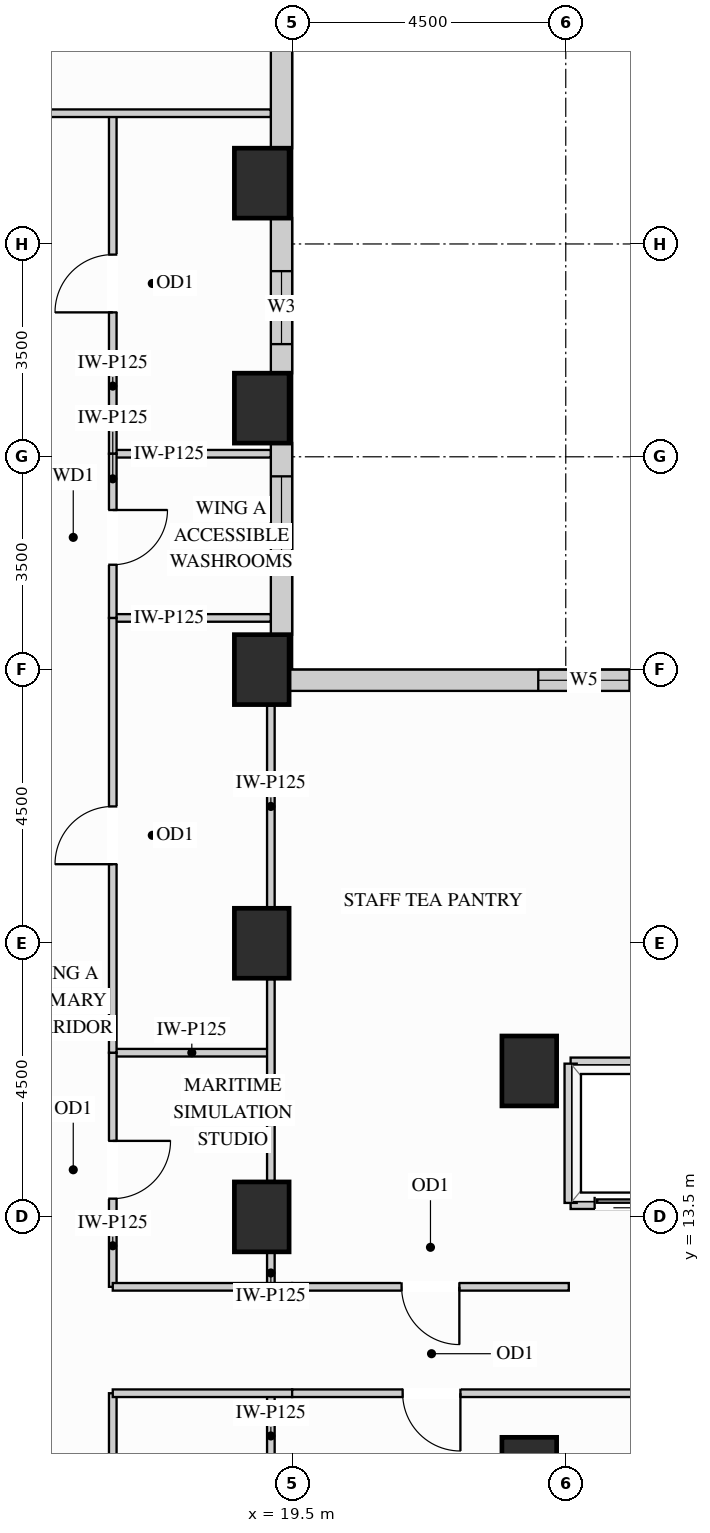
"""IFC4 building model, lengths in metres.
Left out: names, types, materials, properties, quantities, classifications, styles, units other than length and angle.
Written with IfcOpenShell. Run it as: python <this file> out.ifc"""

import sys

from ifc_helpers import new_model, si_unit, direction, frame, frame_2d, origin, origin_2d, place, context, subcontext, project, spatial, rectangle, extrude, source, transform, mapped, element, fill, save


model = new_model("IFC4")
c1 = context("Model", 3, precision=1e-05, world=origin(), true_north=direction((0.0, 1.0)))
c2 = subcontext(c1, "Body", "Model", "MODEL_VIEW")
j1 = project(units=[si_unit("LENGTHUNIT", "METRE"), si_unit("PLANEANGLEUNIT", "RADIAN")], contexts=[c1])
p1 = place(None, origin())
s1 = spatial("IfcSite", under=j1, at=p1, CompositionType="ELEMENT")
p2 = place(p1, origin())
s2 = spatial("IfcBuilding", under=s1, at=p2, CompositionType="ELEMENT")
p3 = place(p2, frame((0.0, 0.0, 77.4)))
s3 = spatial("IfcBuildingStorey", under=s2, at=p3, CompositionType="ELEMENT", Elevation=77.4)
m1 = source(origin(), c2, "Body", "SweptSolid", [
    extrude(rectangle(XDim=0.9, YDim=1.15, at=origin_2d()), origin(), (0.0, 0.0, 1.0), 3.38),
])
for number, where, z_axis, x_axis in (
    (1, (19.0, 13.5, 0.0), (0.0, 0.0, 1.0), (1.0, 0.0, 0.0)),
    (2, (19.0, 18.0, 0.0), (0.0, 0.0, 1.0), (1.0, 0.0, 0.0)),
    (3, (19.0, 22.5, 0.0), (0.0, 0.0, 1.0), (1.0, 0.0, 0.0)),
    (4, (19.0, 26.8, 0.0), (0.0, 0.0, 1.0), (1.0, 0.0, 0.0)),
    (5, (19.0, 30.5, 0.0), (0.0, 0.0, 1.0), (1.0, 0.0, 0.0)),
    (6, (23.4, 15.9, 0.0), (0.0, 0.0, 1.0), (1.0, 0.0, 0.0)),
    (7, (23.4, 9.3, 0.0), (0.0, 0.0, 1.0), (1.0, 0.0, 0.0)),
):
    element("IfcColumn", number, at=place(p3, frame(where, z_axis=z_axis, x_axis=x_axis)), inside=s3, PredefinedType="COLUMN", context=c2, shape_type="MappedRepresentation", body=[
        mapped(m1, transform((0.0, 0.0, 0.0), x_axis=(1.0, 0.0, 0.0), y_axis=(0.0, 1.0, 0.0), z_axis=(0.0, 0.0, 1.0))),
    ])
p4 = place(p3, frame((34.427, 22.325, 0.0), z_axis=(0.0, 0.0, 1.0), x_axis=(-1.0, 0.0, 0.0)))
e8 = element("IfcWall", 8, at=p4, inside=s3, PredefinedType="SOLIDWALL", context=c2, shape_type="SweptSolid", body=[
    extrude(rectangle(XDim=14.979, YDim=0.35, at=frame_2d((7.49, 0.0))), origin(), (0.0, 0.0, 1.0), 3.365),
])
p5 = place(p4, frame((4.1, 0.0, 0.78)))
e9 = element("IfcOpeningElement", 9, at=p5, cuts=e8, PredefinedType="OPENING", context=c2, shape_type="SweptSolid", body=[
    extrude(rectangle(XDim=1.5, YDim=2.0, at=frame_2d((0.75, 1.0))), frame((0.0, 0.185, 0.0), z_axis=(0.0, -1.0, 0.0), x_axis=(1.0, 0.0, 0.0)), (0.0, 0.0, 1.0), 0.37),
])
p6 = place(p4, frame((9.379, 0.0, 0.78)))
e10 = element("IfcOpeningElement", 10, at=p6, cuts=e8, PredefinedType="OPENING", context=c2, shape_type="SweptSolid", body=[
    extrude(rectangle(XDim=1.5, YDim=2.0, at=frame_2d((0.75, 1.0))), frame((0.0, 0.185, 0.0), z_axis=(0.0, -1.0, 0.0), x_axis=(1.0, 0.0, 0.0)), (0.0, 0.0, 1.0), 0.37),
])
p7 = place(p3, frame((19.325, 23.073, 0.0), z_axis=(0.0, 0.0, 1.0), x_axis=(0.0, 1.0, 0.0)))
e11 = element("IfcWall", 11, at=p7, inside=s3, PredefinedType="SOLIDWALL", context=c2, shape_type="SweptSolid", body=[
    extrude(rectangle(XDim=3.154, YDim=0.35, at=frame_2d((1.577, 0.0))), origin(), (0.0, 0.0, 1.0), 2.519),
])
p8 = place(p7, frame((1.105, 0.0, 0.78)))
e12 = element("IfcOpeningElement", 12, at=p8, cuts=e11, PredefinedType="OPENING", context=c2, shape_type="SweptSolid", body=[
    extrude(rectangle(XDim=1.5, YDim=1.559, at=frame_2d((0.75, 0.78))), frame((0.0, 0.185, 0.0), z_axis=(0.0, -1.0, 0.0), x_axis=(1.0, 0.0, 0.0)), (0.0, 0.0, 1.0), 0.37),
])
p9 = place(p3, frame((19.325, 27.373, 0.0), z_axis=(0.0, 0.0, 1.0), x_axis=(0.0, 1.0, 0.0)))
e13 = element("IfcWall", 13, at=p9, inside=s3, PredefinedType="SOLIDWALL", context=c2, shape_type="SweptSolid", body=[
    extrude(rectangle(XDim=2.554, YDim=0.35, at=frame_2d((1.277, 0.0))), origin(), (0.0, 0.0, 1.0), 2.519),
])
p10 = place(p9, frame((0.48, 0.0, 0.78)))
e14 = element("IfcOpeningElement", 14, at=p10, cuts=e13, PredefinedType="OPENING", context=c2, shape_type="SweptSolid", body=[
    extrude(rectangle(XDim=1.2, YDim=1.559, at=frame_2d((0.6, 0.78))), frame((0.0, 0.185, 0.0), z_axis=(0.0, -1.0, 0.0), x_axis=(1.0, 0.0, 0.0)), (0.0, 0.0, 1.0), 0.37),
])
m2 = source(origin(), c2, "Body", "SweptSolid", [
    extrude(rectangle(XDim=3.354, YDim=0.35, at=frame_2d((1.677, 0.0))), origin(), (0.0, 0.0, 1.0), 2.519),
])
p11 = place(p3, frame((19.325, 31.073, 0.0), z_axis=(0.0, 0.0, 1.0), x_axis=(0.0, 1.0, 0.0)))
e15 = element("IfcWall", 15, at=p11, inside=s3, PredefinedType="SOLIDWALL", context=c2, shape_type="MappedRepresentation", body=[
    mapped(m2, transform((0.0, 0.0, 0.0), x_axis=(1.0, 0.0, 0.0), y_axis=(0.0, 1.0, 0.0), z_axis=(0.0, 0.0, 1.0))),
])
m3 = source(origin(), c2, "Body", "SweptSolid", [
    extrude(rectangle(XDim=2.6, YDim=0.125, at=frame_2d((1.3, 0.0))), origin(), (0.0, 0.0, 1.0), 3.365),
])
p12 = place(p3, frame((16.55, 16.2, 0.0), z_axis=(0.0, 0.0, 1.0), x_axis=(1.0, 0.0, 0.0)))
e16 = element("IfcWall", 16, at=p12, inside=s3, PredefinedType="PARTITIONING", context=c2, shape_type="MappedRepresentation", body=[
    mapped(m3, transform((0.0, 0.0, 0.0), x_axis=(1.0, 0.0, 0.0), y_axis=(0.0, 1.0, 0.0), z_axis=(0.0, 0.0, 1.0))),
])
m4 = source(origin(), c2, "Body", "SweptSolid", [
    extrude(rectangle(XDim=2.598, YDim=0.125, at=frame_2d((1.299, 0.0))), origin(), (0.0, 0.0, 1.0), 3.365),
])
for number, where, z_axis, x_axis in (
    (17, (16.55, 23.35, 0.0), (0.0, 0.0, 1.0), (1.0, 0.0, 0.0)),
    (18, (16.55, 26.05, 0.0), (0.0, 0.0, 1.0), (1.0, 0.0, 0.0)),
):
    element("IfcWall", number, at=place(p3, frame(where, z_axis=z_axis, x_axis=x_axis)), inside=s3, PredefinedType="PARTITIONING", context=c2, shape_type="MappedRepresentation", body=[
        mapped(m4, transform((0.0, 0.0, 0.0), x_axis=(1.0, 0.0, 0.0), y_axis=(0.0, 1.0, 0.0), z_axis=(0.0, 0.0, 1.0))),
    ])
m5 = source(origin(), c2, "Body", "SweptSolid", [
    extrude(rectangle(XDim=0.56, YDim=0.125, at=frame_2d((0.28, 0.0))), origin(), (0.0, 0.0, 1.0), 2.677),
])
p13 = place(p3, frame((19.15, 12.35, 0.0), z_axis=(0.0, 0.0, 1.0), x_axis=(0.0, 1.0, 0.0)))
e19 = element("IfcWall", 19, at=p13, inside=s3, PredefinedType="PARTITIONING", context=c2, shape_type="MappedRepresentation", body=[
    mapped(m5, transform((0.0, 0.0, 0.0), x_axis=(1.0, 0.0, 0.0), y_axis=(0.0, 1.0, 0.0), z_axis=(0.0, 0.0, 1.0))),
])
m6 = source(origin(), c2, "Body", "SweptSolid", [
    extrude(rectangle(XDim=3.32, YDim=0.125, at=frame_2d((1.66, 0.0))), origin(), (0.0, 0.0, 1.0), 2.677),
])
for number, where, z_axis, x_axis in (
    (20, (19.15, 14.09, 0.0), (0.0, 0.0, 1.0), (0.0, 1.0, 0.0)),
    (21, (19.15, 18.59, 0.0), (0.0, 0.0, 1.0), (0.0, 1.0, 0.0)),
):
    element("IfcWall", number, at=place(p3, frame(where, z_axis=z_axis, x_axis=x_axis)), inside=s3, PredefinedType="PARTITIONING", context=c2, shape_type="MappedRepresentation", body=[
        mapped(m6, transform((0.0, 0.0, 0.0), x_axis=(1.0, 0.0, 0.0), y_axis=(0.0, 1.0, 0.0), z_axis=(0.0, 0.0, 1.0))),
    ])
m7 = source(origin(), c2, "Body", "SweptSolid", [
    extrude(rectangle(XDim=1.51, YDim=0.125, at=frame_2d((0.755, 0.0))), origin(), (0.0, 0.0, 1.0), 2.677),
])
p14 = place(p3, frame((19.15, 9.09, 0.0), z_axis=(0.0, 0.0, 1.0), x_axis=(0.0, 1.0, 0.0)))
e22 = element("IfcWall", 22, at=p14, inside=s3, PredefinedType="PARTITIONING", context=c2, shape_type="MappedRepresentation", body=[
    mapped(m7, transform((0.0, 0.0, 0.0), x_axis=(1.0, 0.0, 0.0), y_axis=(0.0, 1.0, 0.0), z_axis=(0.0, 0.0, 1.0))),
])
p15 = place(p3, frame((16.55, 12.35, 0.0), z_axis=(0.0, 0.0, 1.0), x_axis=(0.0, 1.0, 0.0)))
e23 = element("IfcWall", 23, at=p15, inside=s3, PredefinedType="PARTITIONING", context=c2, shape_type="SweptSolid", body=[
    extrude(rectangle(XDim=3.85, YDim=0.125, at=frame_2d((1.925, 0.0))), origin(), (0.0, 0.0, 1.0), 3.365),
])
p16 = place(p15, frame((1.45, 0.0, 0.0)))
e24 = element("IfcOpeningElement", 24, at=p16, cuts=e23, PredefinedType="OPENING", context=c2, shape_type="SweptSolid", body=[
    extrude(rectangle(XDim=0.95, YDim=2.15, at=frame_2d((0.475, 1.075))), frame((0.0, 0.073, 0.0), z_axis=(0.0, -1.0, 0.0), x_axis=(1.0, 0.0, 0.0)), (0.0, 0.0, 1.0), 0.145),
])
p17 = place(p3, frame((16.55, 16.2, 0.0), z_axis=(0.0, 0.0, 1.0), x_axis=(0.0, 1.0, 0.0)))
e25 = element("IfcWall", 25, at=p17, inside=s3, PredefinedType="PARTITIONING", context=c2, shape_type="SweptSolid", body=[
    extrude(rectangle(XDim=7.15, YDim=0.125, at=frame_2d((3.575, 0.0))), origin(), (0.0, 0.0, 1.0), 3.365),
])
p18 = place(p17, frame((3.1, 0.0, 0.0)))
e26 = element("IfcOpeningElement", 26, at=p18, cuts=e25, PredefinedType="OPENING", context=c2, shape_type="SweptSolid", body=[
    extrude(rectangle(XDim=0.95, YDim=2.15, at=frame_2d((0.475, 1.075))), frame((0.0, 0.073, 0.0), z_axis=(0.0, -1.0, 0.0), x_axis=(1.0, 0.0, 0.0)), (0.0, 0.0, 1.0), 0.145),
])
p19 = place(p3, frame((16.55, 26.05, 0.0), z_axis=(0.0, 0.0, 1.0), x_axis=(0.0, 1.0, 0.0)))
e27 = element("IfcWall", 27, at=p19, inside=s3, PredefinedType="PARTITIONING", context=c2, shape_type="SweptSolid", body=[
    extrude(rectangle(XDim=5.6, YDim=0.125, at=frame_2d((2.8, 0.0))), origin(), (0.0, 0.0, 1.0), 3.365),
])
p20 = place(p19, frame((2.325, 0.0, 0.0)))
e28 = element("IfcOpeningElement", 28, at=p20, cuts=e27, PredefinedType="OPENING", context=c2, shape_type="SweptSolid", body=[
    extrude(rectangle(XDim=0.95, YDim=2.15, at=frame_2d((0.475, 1.075))), frame((0.0, 0.073, 0.0), z_axis=(0.0, -1.0, 0.0), x_axis=(1.0, 0.0, 0.0)), (0.0, 0.0, 1.0), 0.145),
])
p21 = place(p3, frame((16.55, 4.65, 0.0), z_axis=(0.0, 0.0, 1.0), x_axis=(0.0, 1.0, 0.0)))
e29 = element("IfcWall", 29, at=p21, inside=s3, PredefinedType="PARTITIONING", context=c2, shape_type="SweptSolid", body=[
    extrude(rectangle(XDim=5.95, YDim=0.125, at=frame_2d((2.975, 0.0))), origin(), (0.0, 0.0, 1.0), 3.365),
])
p22 = place(p21, frame((2.5, 0.0, 0.0)))
e30 = element("IfcOpeningElement", 30, at=p22, cuts=e29, PredefinedType="OPENING", context=c2, shape_type="SweptSolid", body=[
    extrude(rectangle(XDim=0.95, YDim=2.15, at=frame_2d((0.475, 1.075))), frame((0.0, 0.073, 0.0), z_axis=(0.0, -1.0, 0.0), x_axis=(1.0, 0.0, 0.0)), (0.0, 0.0, 1.0), 0.145),
])
p23 = place(p3, frame((16.55, 23.35, 0.0), z_axis=(0.0, 0.0, 1.0), x_axis=(0.0, 1.0, 0.0)))
e31 = element("IfcWall", 31, at=p23, inside=s3, PredefinedType="PARTITIONING", context=c2, shape_type="SweptSolid", body=[
    extrude(rectangle(XDim=2.7, YDim=0.125, at=frame_2d((1.35, 0.0))), origin(), (0.0, 0.0, 1.0), 3.365),
])
p24 = place(p23, frame((0.875, 0.0, 0.0)))
e32 = element("IfcOpeningElement", 32, at=p24, cuts=e31, PredefinedType="OPENING", context=c2, shape_type="SweptSolid", body=[
    extrude(rectangle(XDim=0.9, YDim=2.15, at=frame_2d((0.45, 1.075))), frame((0.0, 0.073, 0.0), z_axis=(0.0, -1.0, 0.0), x_axis=(1.0, 0.0, 0.0)), (0.0, 0.0, 1.0), 0.145),
])
m8 = source(origin(), c2, "Body", "SweptSolid", [
    extrude(rectangle(XDim=7.498, YDim=0.125, at=frame_2d((3.749, 0.0))), origin(), (0.0, 0.0, 1.0), 2.828),
])
p25 = place(p3, frame((11.65, 31.65, 0.0), z_axis=(0.0, 0.0, 1.0), x_axis=(1.0, 0.0, 0.0)))
e33 = element("IfcWall", 33, at=p25, inside=s3, PredefinedType="PARTITIONING", context=c2, shape_type="MappedRepresentation", body=[
    mapped(m8, transform((0.0, 0.0, 0.0), x_axis=(1.0, 0.0, 0.0), y_axis=(0.0, 1.0, 0.0), z_axis=(0.0, 0.0, 1.0))),
])
m9 = source(origin(), c2, "Body", "SweptSolid", [
    extrude(rectangle(XDim=2.95, YDim=0.125, at=frame_2d((1.475, 0.0))), origin(), (0.0, 0.0, 1.0), 3.365),
])
p26 = place(p3, frame((16.55, 12.35, 0.0), z_axis=(0.0, 0.0, 1.0), x_axis=(1.0, 0.0, 0.0)))
e34 = element("IfcWall", 34, at=p26, inside=s3, PredefinedType="PARTITIONING", context=c2, shape_type="MappedRepresentation", body=[
    mapped(m9, transform((0.0, 0.0, 0.0), x_axis=(1.0, 0.0, 0.0), y_axis=(0.0, 1.0, 0.0), z_axis=(0.0, 0.0, 1.0))),
])
p27 = place(p3, frame((19.5, 12.35, 0.0), z_axis=(0.0, 0.0, 1.0), x_axis=(1.0, 0.0, 0.0)))
e35 = element("IfcWall", 35, at=p27, inside=s3, PredefinedType="PARTITIONING", context=c2, shape_type="SweptSolid", body=[
    extrude(rectangle(XDim=4.55, YDim=0.125, at=frame_2d((2.275, 0.0))), origin(), (0.0, 0.0, 1.0), 3.365),
])
p28 = place(p27, frame((1.8, 0.0, 0.0)))
e36 = element("IfcOpeningElement", 36, at=p28, cuts=e35, PredefinedType="OPENING", context=c2, shape_type="SweptSolid", body=[
    extrude(rectangle(XDim=0.95, YDim=2.15, at=frame_2d((0.475, 1.075))), frame((0.0, 0.073, 0.0), z_axis=(0.0, -1.0, 0.0), x_axis=(1.0, 0.0, 0.0)), (0.0, 0.0, 1.0), 0.145),
])
p29 = place(p3, frame((16.55, 10.6, 0.0), z_axis=(0.0, 0.0, 1.0), x_axis=(1.0, 0.0, 0.0)))
e37 = element("IfcWall", 37, at=p29, inside=s3, PredefinedType="PARTITIONING", context=c2, shape_type="MappedRepresentation", body=[
    mapped(m9, transform((0.0, 0.0, 0.0), x_axis=(1.0, 0.0, 0.0), y_axis=(0.0, 1.0, 0.0), z_axis=(0.0, 0.0, 1.0))),
])
p30 = place(p3, frame((19.5, 10.6, 0.0), z_axis=(0.0, 0.0, 1.0), x_axis=(1.0, 0.0, 0.0)))
e38 = element("IfcWall", 38, at=p30, inside=s3, PredefinedType="PARTITIONING", context=c2, shape_type="SweptSolid", body=[
    extrude(rectangle(XDim=7.45, YDim=0.125, at=frame_2d((3.725, 0.0))), origin(), (0.0, 0.0, 1.0), 3.365),
])
p31 = place(p30, frame((1.817, 0.0, 0.0)))
e39 = element("IfcOpeningElement", 39, at=p31, cuts=e38, PredefinedType="OPENING", context=c2, shape_type="SweptSolid", body=[
    extrude(rectangle(XDim=0.95, YDim=2.15, at=frame_2d((0.475, 1.075))), frame((0.0, 0.073, 0.0), z_axis=(0.0, -1.0, 0.0), x_axis=(1.0, 0.0, 0.0)), (0.0, 0.0, 1.0), 0.145),
])
m10 = source(origin(), c2, "Body", "SweptSolid", [
    extrude(rectangle(XDim=1.89, YDim=0.2, at=frame_2d((0.945, 0.0))), origin(), (0.0, 0.0, 1.0), 2.677),
])
p32 = place(p3, frame((24.08, 16.02, 0.0), z_axis=(0.0, 0.0, 1.0), x_axis=(1.0, 0.0, 0.0)))
e40 = element("IfcWall", 40, at=p32, inside=s3, PredefinedType="PARTITIONING", context=c2, shape_type="MappedRepresentation", body=[
    mapped(m10, transform((0.0, 0.0, 0.0), x_axis=(1.0, 0.0, 0.0), y_axis=(0.0, 1.0, 0.0), z_axis=(0.0, 0.0, 1.0))),
])
p33 = place(p3, frame((24.08, 13.73, 0.0), z_axis=(0.0, 0.0, 1.0), x_axis=(1.0, 0.0, 0.0)))
e41 = element("IfcWall", 41, at=p33, inside=s3, PredefinedType="PARTITIONING", context=c2, shape_type="SweptSolid", body=[
    extrude(rectangle(XDim=1.89, YDim=0.2, at=frame_2d((0.945, 0.0))), origin(), (0.0, 0.0, 1.0), 2.446),
])
p34 = place(p33, frame((0.395, 0.0, 0.0)))
e42 = element("IfcOpeningElement", 42, at=p34, cuts=e41, PredefinedType="OPENING", context=c2, shape_type="SweptSolid", body=[
    extrude(rectangle(XDim=1.1, YDim=2.2, at=frame_2d((0.55, 1.1))), frame((0.0, 0.11, 0.0), z_axis=(0.0, -1.0, 0.0), x_axis=(1.0, 0.0, 0.0)), (0.0, 0.0, 1.0), 0.22),
])
m11 = source(origin(), c2, "Body", "SweptSolid", [
    extrude(rectangle(XDim=2.29, YDim=0.2, at=frame_2d((1.145, 0.0))), origin(), (0.0, 0.0, 1.0), 3.365),
])
p35 = place(p3, frame((24.08, 13.73, 0.0), z_axis=(0.0, 0.0, 1.0), x_axis=(0.0, 1.0, 0.0)))
e43 = element("IfcWall", 43, at=p35, inside=s3, PredefinedType="PARTITIONING", context=c2, shape_type="MappedRepresentation", body=[
    mapped(m11, transform((0.0, 0.0, 0.0), x_axis=(1.0, 0.0, 0.0), y_axis=(0.0, 1.0, 0.0), z_axis=(0.0, 0.0, 1.0))),
])
m12 = source(origin(), c2, "Body", "SweptSolid", [
    extrude(rectangle(XDim=1.1, YDim=2.2, at=frame_2d((0.55, 1.1))), frame((0.0, 0.025, 0.0), z_axis=(0.0, -1.0, 0.0), x_axis=(1.0, 0.0, 0.0)), (0.0, 0.0, 1.0), 0.05),
])
p36 = place(p34, origin())
e44 = element("IfcDoor", 44, at=p36, inside=s3, OperationType="SLIDING_TO_LEFT", PredefinedType="DOOR", context=c2, shape_type="MappedRepresentation", body=[
    mapped(m12, transform((0.0, 0.0, 0.0), x_axis=(1.0, 0.0, 0.0), y_axis=(0.0, 1.0, 0.0), z_axis=(0.0, 0.0, 1.0))),
])
fill(e42, e44)
m13 = source(origin(), c2, "Body", "SweptSolid", [
    extrude(rectangle(XDim=0.95, YDim=2.15, at=frame_2d((0.475, 1.075))), frame((0.0, 0.025, 0.0), z_axis=(0.0, -1.0, 0.0), x_axis=(1.0, 0.0, 0.0)), (0.0, 0.0, 1.0), 0.05),
])
p37 = place(p16, origin())
e45 = element("IfcDoor", 45, at=p37, inside=s3, OperationType="SINGLE_SWING_RIGHT", PredefinedType="DOOR", context=c2, shape_type="MappedRepresentation", body=[
    mapped(m13, transform((0.0, 0.0, 0.0), x_axis=(1.0, 0.0, 0.0), y_axis=(0.0, 1.0, 0.0), z_axis=(0.0, 0.0, 1.0))),
])
fill(e24, e45)
p38 = place(p18, origin())
e46 = element("IfcDoor", 46, at=p38, inside=s3, OperationType="SINGLE_SWING_LEFT", PredefinedType="DOOR", context=c2, shape_type="MappedRepresentation", body=[
    mapped(m13, transform((0.0, 0.0, 0.0), x_axis=(1.0, 0.0, 0.0), y_axis=(0.0, 1.0, 0.0), z_axis=(0.0, 0.0, 1.0))),
])
fill(e26, e46)
p39 = place(p20, origin())
e47 = element("IfcDoor", 47, at=p39, inside=s3, OperationType="SINGLE_SWING_LEFT", PredefinedType="DOOR", context=c2, shape_type="MappedRepresentation", body=[
    mapped(m13, transform((0.0, 0.0, 0.0), x_axis=(1.0, 0.0, 0.0), y_axis=(0.0, 1.0, 0.0), z_axis=(0.0, 0.0, 1.0))),
])
fill(e28, e47)
p40 = place(p28, origin())
e48 = element("IfcDoor", 48, at=p40, inside=s3, OperationType="SINGLE_SWING_RIGHT", PredefinedType="DOOR", context=c2, shape_type="MappedRepresentation", body=[
    mapped(m13, transform((0.0, 0.0, 0.0), x_axis=(1.0, 0.0, 0.0), y_axis=(0.0, 1.0, 0.0), z_axis=(0.0, 0.0, 1.0))),
])
fill(e36, e48)
p41 = place(p31, origin())
e49 = element("IfcDoor", 49, at=p41, inside=s3, OperationType="SINGLE_SWING_RIGHT", PredefinedType="DOOR", context=c2, shape_type="MappedRepresentation", body=[
    mapped(m13, transform((0.0, 0.0, 0.0), x_axis=(1.0, 0.0, 0.0), y_axis=(0.0, 1.0, 0.0), z_axis=(0.0, 0.0, 1.0))),
])
fill(e39, e49)
m14 = source(origin(), c2, "Body", "SweptSolid", [
    extrude(rectangle(XDim=0.9, YDim=2.15, at=frame_2d((0.45, 1.075))), frame((0.0, 0.025, 0.0), z_axis=(0.0, -1.0, 0.0), x_axis=(1.0, 0.0, 0.0)), (0.0, 0.0, 1.0), 0.05),
])
p42 = place(p24, origin())
e50 = element("IfcDoor", 50, at=p42, inside=s3, OperationType="SINGLE_SWING_RIGHT", PredefinedType="DOOR", context=c2, shape_type="MappedRepresentation", body=[
    mapped(m14, transform((0.0, 0.0, 0.0), x_axis=(1.0, 0.0, 0.0), y_axis=(0.0, 1.0, 0.0), z_axis=(0.0, 0.0, 1.0))),
])
fill(e32, e50)
m15 = source(origin(), c2, "Body", "SweptSolid", [
    extrude(rectangle(XDim=1.2, YDim=1.559, at=frame_2d((0.6, 0.78))), frame((0.0, 0.03, 0.0), z_axis=(0.0, -1.0, 0.0), x_axis=(1.0, 0.0, 0.0)), (0.0, 0.0, 1.0), 0.06),
])
p43 = place(p10, origin())
e51 = element("IfcWindow", 51, at=p43, inside=s3, PartitioningType="SINGLE_PANEL", PredefinedType="WINDOW", context=c2, shape_type="MappedRepresentation", body=[
    mapped(m15, transform((0.0, 0.0, 0.0), x_axis=(1.0, 0.0, 0.0), y_axis=(0.0, 1.0, 0.0), z_axis=(0.0, 0.0, 1.0))),
])
fill(e14, e51)
m16 = source(origin(), c2, "Body", "SweptSolid", [
    extrude(rectangle(XDim=1.5, YDim=2.0, at=frame_2d((0.75, 1.0))), frame((0.0, 0.03, 0.0), z_axis=(0.0, -1.0, 0.0), x_axis=(1.0, 0.0, 0.0)), (0.0, 0.0, 1.0), 0.06),
])
p44 = place(p6, origin())
e52 = element("IfcWindow", 52, at=p44, inside=s3, PartitioningType="SINGLE_PANEL", PredefinedType="WINDOW", context=c2, shape_type="MappedRepresentation", body=[
    mapped(m16, transform((0.0, 0.0, 0.0), x_axis=(1.0, 0.0, 0.0), y_axis=(0.0, 1.0, 0.0), z_axis=(0.0, 0.0, 1.0))),
])
fill(e10, e52)
m17 = source(origin(), c2, "Body", "SweptSolid", [
    extrude(rectangle(XDim=1.5, YDim=1.559, at=frame_2d((0.75, 0.78))), frame((0.0, 0.03, 0.0), z_axis=(0.0, -1.0, 0.0), x_axis=(1.0, 0.0, 0.0)), (0.0, 0.0, 1.0), 0.06),
])
p45 = place(p8, origin())
e53 = element("IfcWindow", 53, at=p45, inside=s3, PartitioningType="SINGLE_PANEL", PredefinedType="WINDOW", context=c2, shape_type="MappedRepresentation", body=[
    mapped(m17, transform((0.0, 0.0, 0.0), x_axis=(1.0, 0.0, 0.0), y_axis=(0.0, 1.0, 0.0), z_axis=(0.0, 0.0, 1.0))),
])
fill(e12, e53)
save(model, sys.argv[1])
